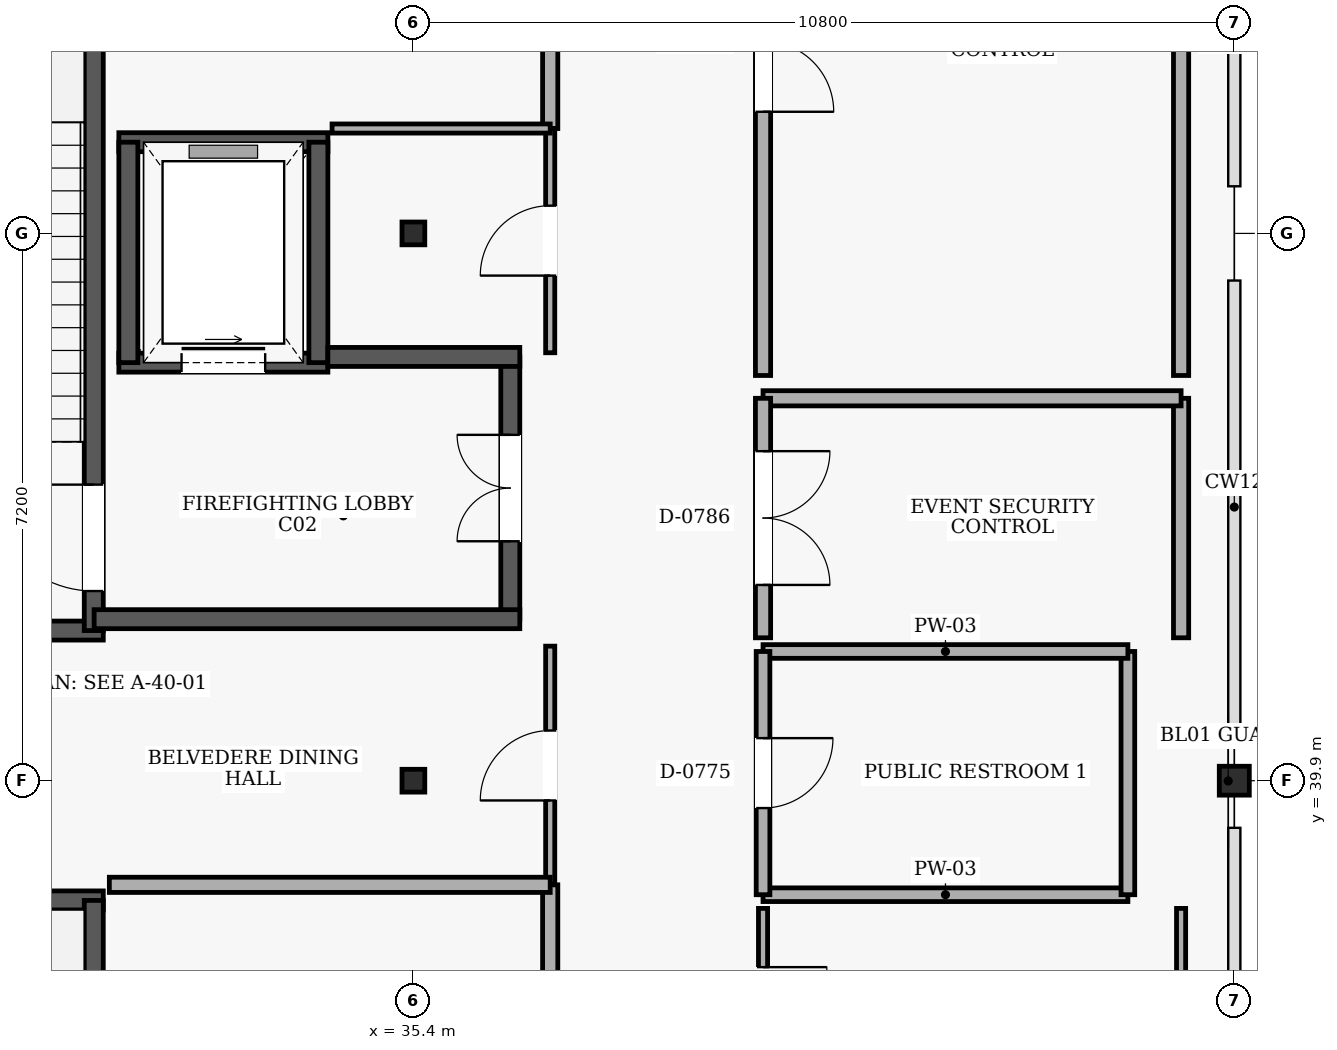
"""IFC4 building model, lengths in metres.
Left out: names, types, materials, properties, quantities, classifications, styles, units other than length and angle.
Written with IfcOpenShell. Run it as: python <this file> out.ifc"""

import sys

from ifc_helpers import new_model, si_unit, direction, frame, frame_2d, origin, origin_2d, place, context, subcontext, project, spatial, rectangle, hollow_rectangle, i_section, extrude, element, fill, save


model = new_model("IFC4")
c1 = context("Model", 3, precision=1e-05, world=origin(), true_north=direction((0.0, 1.0)))
c2 = subcontext(c1, "Body", "Model", "MODEL_VIEW")
j1 = project(units=[si_unit("LENGTHUNIT", "METRE"), si_unit("PLANEANGLEUNIT", "RADIAN")], contexts=[c1])
p1 = place(None, origin())
s1 = spatial("IfcSite", under=j1, at=p1, CompositionType="ELEMENT")
p2 = place(p1, origin())
s2 = spatial("IfcBuilding", under=s1, at=p2, CompositionType="ELEMENT")
p3 = place(p2, frame((0.0, 0.0, 24.6)))
s3 = spatial("IfcBuildingStorey", under=s2, at=p3, CompositionType="ELEMENT", Elevation=24.6)
for number, where, z_axis, x_axis in (
    (1, (35.4, 39.9, 0.0), (0.0, 0.0, 1.0), (1.0, 0.0, 0.0)),
    (2, (35.4, 47.1, 0.0), (0.0, 0.0, 1.0), (1.0, 0.0, 0.0)),
):
    element("IfcColumn", number, at=place(p3, frame(where, z_axis=z_axis, x_axis=x_axis)), inside=s3, PredefinedType="COLUMN", context=c2, shape_type="SweptSolid", body=[
        extrude(hollow_rectangle(XDim=0.3, YDim=0.3, WallThickness=0.016, at=origin_2d()), origin(), (0.0, 0.0, 1.0), 4.8),
    ])
p4 = place(p3, frame((46.2, 39.9, 0.0), z_axis=(0.0, 0.0, 1.0), x_axis=(1.0, 0.0, 0.0)))
e3 = element("IfcColumn", 3, at=p4, inside=s3, PredefinedType="COLUMN", context=c2, shape_type="SweptSolid", body=[
    extrude(i_section(OverallWidth=0.395, OverallDepth=0.38, WebThickness=0.019, FlangeThickness=0.03, at=origin_2d()), origin(), (0.0, 0.0, 1.0), 4.8),
])
p5 = place(p3, frame((31.32, 38.325, 0.0), z_axis=(0.0, 0.0, 1.0), x_axis=(-1.0, 0.0, 0.0)))
e4 = element("IfcWall", 4, at=p5, inside=s3, PredefinedType="SHEAR", context=c2, shape_type="SweptSolid", body=[
    extrude(rectangle(XDim=5.37, YDim=0.25, at=frame_2d((2.685, 0.0))), origin(), (0.0, 0.0, 1.0), 4.5),
])
p6 = place(p3, frame((31.195, 27.475, 0.0), z_axis=(0.0, 0.0, 1.0), x_axis=(0.0, 1.0, 0.0)))
e5 = element("IfcWall", 5, at=p6, inside=s3, PredefinedType="SHEAR", context=c2, shape_type="SweptSolid", body=[
    extrude(rectangle(XDim=10.85, YDim=0.25, at=frame_2d((5.425, 0.0))), origin(), (0.0, 0.0, 1.0), 4.5),
])
p7 = place(p6, frame((0.52, 0.0, 0.0)))
e6 = element("IfcOpeningElement", 6, at=p7, cuts=e5, PredefinedType="OPENING", context=c2, shape_type="SweptSolid", body=[
    extrude(rectangle(XDim=1.4, YDim=2.15, at=frame_2d((0.7, 1.075))), frame((0.0, 0.135, 0.0), z_axis=(0.0, -1.0, 0.0), x_axis=(1.0, 0.0, 0.0)), (0.0, 0.0, 1.0), 0.27),
])
p8 = place(p3, frame((25.95, 41.875, 0.0), z_axis=(0.0, 0.0, 1.0), x_axis=(1.0, 0.0, 0.0)))
e7 = element("IfcWall", 7, at=p8, inside=s3, PredefinedType="SHEAR", context=c2, shape_type="SweptSolid", body=[
    extrude(rectangle(XDim=5.37, YDim=0.25, at=frame_2d((2.685, 0.0))), origin(), (0.0, 0.0, 1.0), 4.5),
])
p9 = place(p3, frame((31.195, 41.875, 0.0), z_axis=(0.0, 0.0, 1.0), x_axis=(0.0, 1.0, 0.0)))
e8 = element("IfcWall", 8, at=p9, inside=s3, PredefinedType="SHEAR", context=c2, shape_type="SweptSolid", body=[
    extrude(rectangle(XDim=10.85, YDim=0.25, at=frame_2d((5.425, 0.0))), origin(), (0.0, 0.0, 1.0), 4.5),
])
p10 = place(p9, frame((0.52, 0.0, 0.0)))
e9 = element("IfcOpeningElement", 9, at=p10, cuts=e8, PredefinedType="OPENING", context=c2, shape_type="SweptSolid", body=[
    extrude(rectangle(XDim=1.4, YDim=2.15, at=frame_2d((0.7, 1.075))), frame((0.0, 0.135, 0.0), z_axis=(0.0, -1.0, 0.0), x_axis=(1.0, 0.0, 0.0)), (0.0, 0.0, 1.0), 0.27),
])
p11 = place(p3, frame((31.525, 45.4, 0.0), z_axis=(0.0, 0.0, 1.0), x_axis=(1.0, 0.0, 0.0)))
e10 = element("IfcWall", 10, at=p11, inside=s3, PredefinedType="SHEAR", context=c2, shape_type="SweptSolid", body=[
    extrude(rectangle(XDim=2.75, YDim=0.25, at=frame_2d((1.375, 0.0))), origin(), (0.0, 0.0, 1.0), 4.5),
])
p12 = place(p11, frame((0.825, 0.0, 0.0)))
e11 = element("IfcOpeningElement", 11, at=p12, cuts=e10, PredefinedType="OPENING", context=c2, shape_type="SweptSolid", body=[
    extrude(rectangle(XDim=1.1, YDim=2.15, at=frame_2d((0.55, 1.075))), frame((0.0, 0.135, 0.0), z_axis=(0.0, -1.0, 0.0), x_axis=(1.0, 0.0, 0.0)), (0.0, 0.0, 1.0), 0.27),
])
p13 = place(p3, frame((34.275, 48.3, 0.0), z_axis=(0.0, 0.0, 1.0), x_axis=(-1.0, 0.0, 0.0)))
e12 = element("IfcWall", 12, at=p13, inside=s3, PredefinedType="SHEAR", context=c2, shape_type="SweptSolid", body=[
    extrude(rectangle(XDim=2.75, YDim=0.25, at=frame_2d((1.375, 0.0))), origin(), (0.0, 0.0, 1.0), 4.5),
])
for number, where, z_axis, x_axis in (
    (13, (31.65, 48.3, 0.0), (0.0, 0.0, 1.0), (0.0, -1.0, 0.0)),
    (14, (34.15, 45.4, 0.0), (0.0, 0.0, 1.0), (0.0, 1.0, 0.0)),
):
    element("IfcWall", number, at=place(p3, frame(where, z_axis=z_axis, x_axis=x_axis)), inside=s3, PredefinedType="SHEAR", context=c2, shape_type="SweptSolid", body=[
        extrude(rectangle(XDim=2.9, YDim=0.25, at=frame_2d((1.45, 0.0))), origin(), (0.0, 0.0, 1.0), 4.5),
    ])
p14 = place(p3, frame((36.675, 42.025, 0.0), z_axis=(0.0, 0.0, 1.0), x_axis=(0.0, 1.0, 0.0)))
e15 = element("IfcWall", 15, at=p14, inside=s3, PredefinedType="SHEAR", context=c2, shape_type="SweptSolid", body=[
    extrude(rectangle(XDim=3.45, YDim=0.25, at=frame_2d((1.725, 0.0))), origin(), (0.0, 0.0, 1.0), 4.5),
])
p15 = place(p14, frame((1.025, 0.0, 0.0)))
e16 = element("IfcOpeningElement", 16, at=p15, cuts=e15, PredefinedType="OPENING", context=c2, shape_type="SweptSolid", body=[
    extrude(rectangle(XDim=1.4, YDim=2.15, at=frame_2d((0.7, 1.075))), frame((0.0, 0.135, 0.0), z_axis=(0.0, -1.0, 0.0), x_axis=(1.0, 0.0, 0.0)), (0.0, 0.0, 1.0), 0.27),
])
p16 = place(p3, frame((34.275, 45.475, 0.0), z_axis=(0.0, 0.0, 1.0), x_axis=(1.0, 0.0, 0.0)))
e17 = element("IfcWall", 17, at=p16, inside=s3, PredefinedType="SHEAR", context=c2, shape_type="SweptSolid", body=[
    extrude(rectangle(XDim=2.525, YDim=0.25, at=frame_2d((1.263, 0.0))), origin(), (0.0, 0.0, 1.0), 4.5),
])
p17 = place(p3, frame((31.2, 42.025, 0.0), z_axis=(0.0, 0.0, 1.0), x_axis=(1.0, 0.0, 0.0)))
e18 = element("IfcWall", 18, at=p17, inside=s3, PredefinedType="SHEAR", context=c2, shape_type="SweptSolid", body=[
    extrude(rectangle(XDim=5.6, YDim=0.25, at=frame_2d((2.8, 0.0))), origin(), (0.0, 0.0, 1.0), 4.5),
])
p18 = place(p3, frame((40.0, 38.4, 0.0), z_axis=(0.0, 0.0, 1.0), x_axis=(1.0, 0.0, 0.0)))
e19 = element("IfcWall", 19, at=p18, inside=s3, PredefinedType="PARTITIONING", context=c2, shape_type="SweptSolid", body=[
    extrude(rectangle(XDim=4.8, YDim=0.18, at=frame_2d((2.4, 0.0))), origin(), (0.0, 0.0, 1.0), 4.5),
])
p19 = place(p3, frame((44.8, 38.4, 0.0), z_axis=(0.0, 0.0, 1.0), x_axis=(0.0, 1.0, 0.0)))
e20 = element("IfcWall", 20, at=p19, inside=s3, PredefinedType="PARTITIONING", context=c2, shape_type="SweptSolid", body=[
    extrude(rectangle(XDim=3.2, YDim=0.18, at=frame_2d((1.6, 0.0))), origin(), (0.0, 0.0, 1.0), 4.5),
])
p20 = place(p3, frame((44.8, 41.6, 0.0), z_axis=(0.0, 0.0, 1.0), x_axis=(-1.0, 0.0, 0.0)))
e21 = element("IfcWall", 21, at=p20, inside=s3, PredefinedType="PARTITIONING", context=c2, shape_type="SweptSolid", body=[
    extrude(rectangle(XDim=4.8, YDim=0.18, at=frame_2d((2.4, 0.0))), origin(), (0.0, 0.0, 1.0), 4.5),
])
p21 = place(p3, frame((40.0, 41.6, 0.0), z_axis=(0.0, 0.0, 1.0), x_axis=(0.0, -1.0, 0.0)))
e22 = element("IfcWall", 22, at=p21, inside=s3, PredefinedType="PARTITIONING", context=c2, shape_type="SweptSolid", body=[
    extrude(rectangle(XDim=3.2, YDim=0.18, at=frame_2d((1.6, 0.0))), origin(), (0.0, 0.0, 1.0), 4.5),
])
p22 = place(p21, frame((1.14, 0.0, 0.0)))
e23 = element("IfcOpeningElement", 23, at=p22, cuts=e22, PredefinedType="OPENING", context=c2, shape_type="SweptSolid", body=[
    extrude(rectangle(XDim=0.92, YDim=2.1, at=frame_2d((0.46, 1.05))), frame((0.0, 0.1, 0.0), z_axis=(0.0, -1.0, 0.0), x_axis=(1.0, 0.0, 0.0)), (0.0, 0.0, 1.0), 0.2),
])
p23 = place(p3, frame((37.2, 38.53, 0.0), z_axis=(0.0, 0.0, 1.0), x_axis=(0.0, 1.0, 0.0)))
e24 = element("IfcWall", 24, at=p23, inside=s3, PredefinedType="PARTITIONING", context=c2, shape_type="SweptSolid", body=[
    extrude(rectangle(XDim=3.14, YDim=0.12, at=frame_2d((1.57, 0.0))), origin(), (0.0, 0.0, 1.0), 4.5),
])
p24 = place(p23, frame((1.11, 0.0, 0.0)))
e25 = element("IfcOpeningElement", 25, at=p24, cuts=e24, PredefinedType="OPENING", context=c2, shape_type="SweptSolid", body=[
    extrude(rectangle(XDim=0.92, YDim=2.1, at=frame_2d((0.46, 1.05))), frame((0.0, 0.07, 0.0), z_axis=(0.0, -1.0, 0.0), x_axis=(1.0, 0.0, 0.0)), (0.0, 0.0, 1.0), 0.14),
])
p25 = place(p3, frame((37.2, 34.08, 0.0), z_axis=(0.0, 0.0, 1.0), x_axis=(0.0, 1.0, 0.0)))
e26 = element("IfcWall", 26, at=p25, inside=s3, PredefinedType="PARTITIONING", context=c2, shape_type="SweptSolid", body=[
    extrude(rectangle(XDim=4.45, YDim=0.2, at=frame_2d((2.225, 0.0))), origin(), (0.0, 0.0, 1.0), 4.5),
])
p26 = place(p25, frame((1.665, 0.0, 0.0)))
e27 = element("IfcOpeningElement", 27, at=p26, cuts=e26, PredefinedType="OPENING", context=c2, shape_type="SweptSolid", body=[
    extrude(rectangle(XDim=1.12, YDim=2.15, at=frame_2d((0.56, 1.075))), frame((0.0, 0.11, 0.0), z_axis=(0.0, -1.0, 0.0), x_axis=(1.0, 0.0, 0.0)), (0.0, 0.0, 1.0), 0.22),
])
p27 = place(p3, frame((37.2, 38.53, 0.0), z_axis=(0.0, 0.0, 1.0), x_axis=(-1.0, 0.0, 0.0)))
e28 = element("IfcWall", 28, at=p27, inside=s3, PredefinedType="PARTITIONING", context=c2, shape_type="SweptSolid", body=[
    extrude(rectangle(XDim=5.8, YDim=0.2, at=frame_2d((2.9, 0.0))), origin(), (0.0, 0.0, 1.0), 4.5),
])
p28 = place(p3, frame((37.2, 48.48, 0.0), z_axis=(0.0, 0.0, 1.0), x_axis=(0.0, 1.0, 0.0)))
e29 = element("IfcWall", 29, at=p28, inside=s3, PredefinedType="PARTITIONING", context=c2, shape_type="SweptSolid", body=[
    extrude(rectangle(XDim=4.45, YDim=0.2, at=frame_2d((2.225, 0.0))), origin(), (0.0, 0.0, 1.0), 4.5),
])
p29 = place(p28, frame((1.575, 0.0, 0.0)))
e30 = element("IfcOpeningElement", 30, at=p29, cuts=e29, PredefinedType="OPENING", context=c2, shape_type="SweptSolid", body=[
    extrude(rectangle(XDim=1.3, YDim=2.2, at=frame_2d((0.65, 1.1))), frame((0.0, 0.11, 0.0), z_axis=(0.0, -1.0, 0.0), x_axis=(1.0, 0.0, 0.0)), (0.0, 0.0, 1.0), 0.22),
])
p30 = place(p3, frame((37.2, 45.53, 0.0), z_axis=(0.0, 0.0, 1.0), x_axis=(0.0, 1.0, 0.0)))
e31 = element("IfcWall", 31, at=p30, inside=s3, PredefinedType="PARTITIONING", context=c2, shape_type="SweptSolid", body=[
    extrude(rectangle(XDim=2.95, YDim=0.12, at=frame_2d((1.475, 0.0))), origin(), (0.0, 0.0, 1.0), 4.5),
])
p31 = place(p30, frame((1.015, 0.0, 0.0)))
e32 = element("IfcOpeningElement", 32, at=p31, cuts=e31, PredefinedType="OPENING", context=c2, shape_type="SweptSolid", body=[
    extrude(rectangle(XDim=0.92, YDim=2.1, at=frame_2d((0.46, 1.05))), frame((0.0, 0.07, 0.0), z_axis=(0.0, -1.0, 0.0), x_axis=(1.0, 0.0, 0.0)), (0.0, 0.0, 1.0), 0.14),
])
p32 = place(p3, frame((37.2, 48.48, 0.0), z_axis=(0.0, 0.0, 1.0), x_axis=(-1.0, 0.0, 0.0)))
e33 = element("IfcWall", 33, at=p32, inside=s3, PredefinedType="PARTITIONING", context=c2, shape_type="SweptSolid", body=[
    extrude(rectangle(XDim=2.87, YDim=0.12, at=frame_2d((1.435, 0.0))), origin(), (0.0, 0.0, 1.0), 4.5),
])
p33 = place(p3, frame((45.5, 34.994, 0.0), z_axis=(0.0, 0.0, 1.0), x_axis=(0.0, 1.0, 0.0)))
e34 = element("IfcWall", 34, at=p33, inside=s3, PredefinedType="PARTITIONING", context=c2, shape_type="SweptSolid", body=[
    extrude(rectangle(XDim=3.226, YDim=0.12, at=frame_2d((1.613, 0.0))), origin(), (0.0, 0.0, 1.0), 4.5),
])
p34 = place(p3, frame((40.0, 38.22, 0.0), z_axis=(0.0, 0.0, 1.0), x_axis=(0.0, -1.0, 0.0)))
e35 = element("IfcWall", 35, at=p34, inside=s3, PredefinedType="PARTITIONING", context=c2, shape_type="SweptSolid", body=[
    extrude(rectangle(XDim=3.226, YDim=0.12, at=frame_2d((1.613, 0.0))), origin(), (0.0, 0.0, 1.0), 4.5),
])
p35 = place(p34, frame((0.773, 0.0, 0.0)))
e36 = element("IfcOpeningElement", 36, at=p35, cuts=e35, PredefinedType="OPENING", context=c2, shape_type="SweptSolid", body=[
    extrude(rectangle(XDim=1.68, YDim=2.25, at=frame_2d((0.84, 1.125))), frame((0.0, 0.07, 0.0), z_axis=(0.0, -1.0, 0.0), x_axis=(1.0, 0.0, 0.0)), (0.0, 0.0, 1.0), 0.14),
])
p36 = place(p3, frame((45.5, 41.78, 0.0), z_axis=(0.0, 0.0, 1.0), x_axis=(0.0, 1.0, 0.0)))
e37 = element("IfcWall", 37, at=p36, inside=s3, PredefinedType="PARTITIONING", context=c2, shape_type="SweptSolid", body=[
    extrude(rectangle(XDim=3.151, YDim=0.2, at=frame_2d((1.575, 0.0))), origin(), (0.0, 0.0, 1.0), 4.5),
])
p37 = place(p3, frame((45.5, 44.931, 0.0), z_axis=(0.0, 0.0, 1.0), x_axis=(-1.0, 0.0, 0.0)))
e38 = element("IfcWall", 38, at=p37, inside=s3, PredefinedType="PARTITIONING", context=c2, shape_type="SweptSolid", body=[
    extrude(rectangle(XDim=5.5, YDim=0.2, at=frame_2d((2.75, 0.0))), origin(), (0.0, 0.0, 1.0), 4.5),
])
p38 = place(p3, frame((40.0, 44.931, 0.0), z_axis=(0.0, 0.0, 1.0), x_axis=(0.0, -1.0, 0.0)))
e39 = element("IfcWall", 39, at=p38, inside=s3, PredefinedType="PARTITIONING", context=c2, shape_type="SweptSolid", body=[
    extrude(rectangle(XDim=3.151, YDim=0.2, at=frame_2d((1.575, 0.0))), origin(), (0.0, 0.0, 1.0), 4.5),
])
p39 = place(p38, frame((0.695, 0.0, 0.0)))
e40 = element("IfcOpeningElement", 40, at=p39, cuts=e39, PredefinedType="OPENING", context=c2, shape_type="SweptSolid", body=[
    extrude(rectangle(XDim=1.76, YDim=2.25, at=frame_2d((0.88, 1.125))), frame((0.0, 0.11, 0.0), z_axis=(0.0, -1.0, 0.0), x_axis=(1.0, 0.0, 0.0)), (0.0, 0.0, 1.0), 0.22),
])
p40 = place(p3, frame((45.5, 45.231, 0.0), z_axis=(0.0, 0.0, 1.0), x_axis=(0.0, 1.0, 0.0)))
e41 = element("IfcWall", 41, at=p40, inside=s3, PredefinedType="PARTITIONING", context=c2, shape_type="SweptSolid", body=[
    extrude(rectangle(XDim=8.799, YDim=0.2, at=frame_2d((4.4, 0.0))), origin(), (0.0, 0.0, 1.0), 4.5),
])
p41 = place(p3, frame((40.0, 54.03, 0.0), z_axis=(0.0, 0.0, 1.0), x_axis=(0.0, -1.0, 0.0)))
e42 = element("IfcWall", 42, at=p41, inside=s3, PredefinedType="PARTITIONING", context=c2, shape_type="SweptSolid", body=[
    extrude(rectangle(XDim=8.799, YDim=0.2, at=frame_2d((4.4, 0.0))), origin(), (0.0, 0.0, 1.0), 4.5),
])
p42 = place(p41, frame((3.469, 0.0, 0.0)))
e43 = element("IfcOpeningElement", 43, at=p42, cuts=e42, PredefinedType="OPENING", context=c2, shape_type="SweptSolid", body=[
    extrude(rectangle(XDim=1.86, YDim=2.3, at=frame_2d((0.93, 1.15))), frame((0.0, 0.11, 0.0), z_axis=(0.0, -1.0, 0.0), x_axis=(1.0, 0.0, 0.0)), (0.0, 0.0, 1.0), 0.22),
])
p43 = place(p10, origin())
e44 = element("IfcDoor", 44, at=p43, inside=s3, OperationType="SINGLE_SWING_RIGHT", PredefinedType="DOOR", context=c2, shape_type="SweptSolid", body=[
    extrude(rectangle(XDim=1.4, YDim=2.15, at=frame_2d((0.7, 1.075))), frame((0.0, 0.025, 0.0), z_axis=(0.0, -1.0, 0.0), x_axis=(1.0, 0.0, 0.0)), (0.0, 0.0, 1.0), 0.05),
])
fill(e9, e44)
p44 = place(p12, origin())
e45 = element("IfcDoor", 45, at=p44, inside=s3, OperationType="SLIDING_TO_LEFT", PredefinedType="DOOR", context=c2, shape_type="SweptSolid", body=[
    extrude(rectangle(XDim=1.1, YDim=2.15, at=frame_2d((0.55, 1.075))), frame((0.0, 0.025, 0.0), z_axis=(0.0, -1.0, 0.0), x_axis=(1.0, 0.0, 0.0)), (0.0, 0.0, 1.0), 0.05),
])
fill(e11, e45)
p45 = place(p15, origin())
e46 = element("IfcDoor", 46, at=p45, inside=s3, OperationType="DOUBLE_DOOR_SINGLE_SWING", PredefinedType="DOOR", context=c2, shape_type="SweptSolid", body=[
    extrude(rectangle(XDim=1.4, YDim=2.15, at=frame_2d((0.7, 1.075))), frame((0.0, 0.025, 0.0), z_axis=(0.0, -1.0, 0.0), x_axis=(1.0, 0.0, 0.0)), (0.0, 0.0, 1.0), 0.05),
])
fill(e16, e46)
p46 = place(p22, origin())
e47 = element("IfcDoor", 47, at=p46, inside=s3, OperationType="SINGLE_SWING_LEFT", PredefinedType="DOOR", context=c2, shape_type="SweptSolid", body=[
    extrude(rectangle(XDim=0.92, YDim=2.1, at=frame_2d((0.46, 1.05))), frame((0.0, 0.025, 0.0), z_axis=(0.0, -1.0, 0.0), x_axis=(1.0, 0.0, 0.0)), (0.0, 0.0, 1.0), 0.05),
])
fill(e23, e47)
p47 = place(p24, origin())
e48 = element("IfcDoor", 48, at=p47, inside=s3, OperationType="SINGLE_SWING_LEFT", PredefinedType="DOOR", context=c2, shape_type="SweptSolid", body=[
    extrude(rectangle(XDim=0.92, YDim=2.1, at=frame_2d((0.46, 1.05))), frame((0.0, 0.025, 0.0), z_axis=(0.0, -1.0, 0.0), x_axis=(1.0, 0.0, 0.0)), (0.0, 0.0, 1.0), 0.05),
])
fill(e25, e48)
p48 = place(p31, origin())
e49 = element("IfcDoor", 49, at=p48, inside=s3, OperationType="SINGLE_SWING_LEFT", PredefinedType="DOOR", context=c2, shape_type="SweptSolid", body=[
    extrude(rectangle(XDim=0.92, YDim=2.1, at=frame_2d((0.46, 1.05))), frame((0.0, 0.025, 0.0), z_axis=(0.0, -1.0, 0.0), x_axis=(1.0, 0.0, 0.0)), (0.0, 0.0, 1.0), 0.05),
])
fill(e32, e49)
p49 = place(p35, origin())
e50 = element("IfcDoor", 50, at=p49, inside=s3, OperationType="DOUBLE_DOOR_SINGLE_SWING", PredefinedType="DOOR", context=c2, shape_type="SweptSolid", body=[
    extrude(rectangle(XDim=1.68, YDim=2.25, at=frame_2d((0.84, 1.125))), frame((0.0, 0.025, 0.0), z_axis=(0.0, -1.0, 0.0), x_axis=(1.0, 0.0, 0.0)), (0.0, 0.0, 1.0), 0.05),
])
fill(e36, e50)
p50 = place(p39, origin())
e51 = element("IfcDoor", 51, at=p50, inside=s3, OperationType="DOUBLE_DOOR_SINGLE_SWING", PredefinedType="DOOR", context=c2, shape_type="SweptSolid", body=[
    extrude(rectangle(XDim=1.76, YDim=2.25, at=frame_2d((0.88, 1.125))), frame((0.0, 0.025, 0.0), z_axis=(0.0, -1.0, 0.0), x_axis=(1.0, 0.0, 0.0)), (0.0, 0.0, 1.0), 0.05),
])
fill(e40, e51)
p51 = place(p42, origin())
e52 = element("IfcDoor", 52, at=p51, inside=s3, OperationType="DOUBLE_DOOR_SINGLE_SWING", PredefinedType="DOOR", context=c2, shape_type="SweptSolid", body=[
    extrude(rectangle(XDim=1.86, YDim=2.3, at=frame_2d((0.93, 1.15))), frame((0.0, 0.025, 0.0), z_axis=(0.0, -1.0, 0.0), x_axis=(1.0, 0.0, 0.0)), (0.0, 0.0, 1.0), 0.05),
])
fill(e43, e52)
save(model, sys.argv[1])
